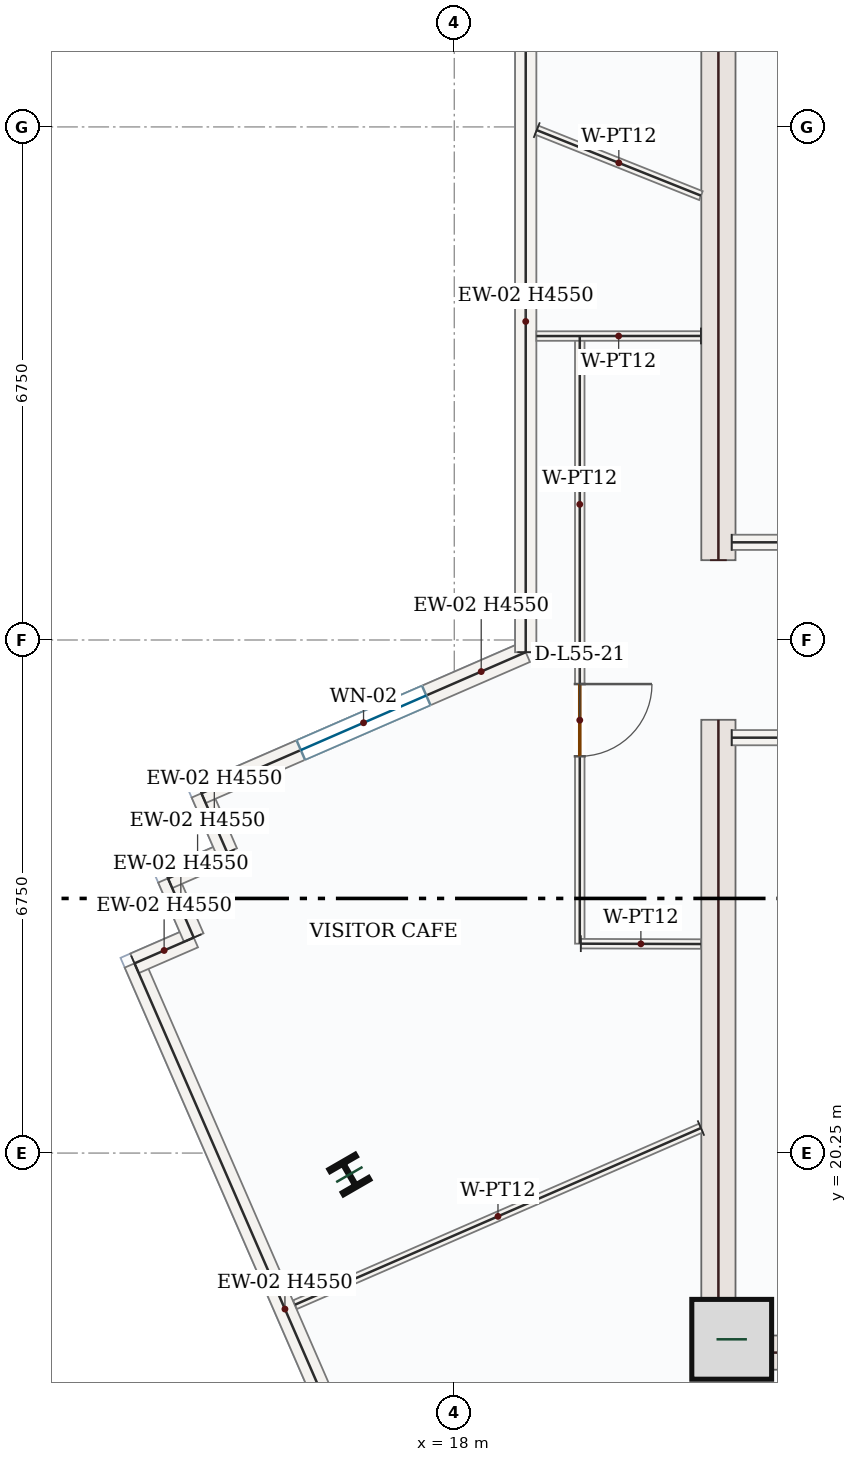
"""IFC4 building model, lengths in metres.
Left out: names, types, materials, properties, quantities, classifications, styles, units other than length and angle.
Written with IfcOpenShell. Run it as: python <this file> out.ifc"""

import sys

from ifc_helpers import new_model, si_unit, direction, frame, frame_2d, origin, origin_2d, place, context, subcontext, project, spatial, rectangle, i_section, extrude, source, transform, mapped, element, fill, save


model = new_model("IFC4")
c1 = context("Model", 3, precision=1e-05, world=origin(), true_north=direction((0.0, 1.0)))
c2 = subcontext(c1, "Body", "Model", "MODEL_VIEW")
j1 = project(units=[si_unit("LENGTHUNIT", "METRE"), si_unit("PLANEANGLEUNIT", "RADIAN")], contexts=[c1])
p1 = place(None, origin())
s1 = spatial("IfcSite", under=j1, at=p1, CompositionType="ELEMENT")
p2 = place(p1, origin())
s2 = spatial("IfcBuilding", under=s1, at=p2, CompositionType="ELEMENT")
p3 = place(p2, frame((0.0, 0.0, 234.3)))
s3 = spatial("IfcBuildingStorey", under=s2, at=p3, CompositionType="ELEMENT", Elevation=234.3)
m1 = source(origin(), c2, "Body", "SweptSolid", [
    extrude(rectangle(XDim=8.55, YDim=0.45, at=frame_2d((4.275, 0.0))), origin(), (0.0, 0.0, 1.0), 4.55),
])
for number, where, z_axis, x_axis in (
    (1, (21.475, 17.4, 0.0), (0.0, 0.0, 1.0), (0.0, 1.0, 0.0)),
    (2, (21.475, 28.05, 0.0), (0.0, 0.0, 1.0), (0.0, 1.0, 0.0)),
):
    element("IfcWall", number, at=place(p3, frame(where, z_axis=z_axis, x_axis=x_axis)), inside=s3, PredefinedType="SHEAR", context=c2, shape_type="MappedRepresentation", body=[
        mapped(m1, transform((0.0, 0.0, 0.0), x_axis=(1.0, 0.0, 0.0), y_axis=(0.0, 1.0, 0.0), z_axis=(0.0, 0.0, 1.0), scale=1.0)),
    ])
m2 = source(origin(), c2, "Body", "SweptSolid", [
    extrude(rectangle(XDim=7.1, YDim=0.45, at=frame_2d((3.55, 0.0))), origin(), (0.0, 0.0, 1.0), 4.55),
])
p4 = place(p3, frame((21.7, 17.625, 0.0), z_axis=(0.0, 0.0, 1.0), x_axis=(1.0, 0.0, 0.0)))
e3 = element("IfcWall", 3, at=p4, inside=s3, PredefinedType="SHEAR", context=c2, shape_type="MappedRepresentation", body=[
    mapped(m2, transform((0.0, 0.0, 0.0), x_axis=(1.0, 0.0, 0.0), y_axis=(0.0, 1.0, 0.0), z_axis=(0.0, 0.0, 1.0), scale=1.0)),
])
m3 = source(origin(), c2, "Body", "SweptSolid", [
    extrude(rectangle(XDim=1.05, YDim=1.05, at=origin_2d()), origin(), (0.0, 0.0, 1.0), 4.8),
])
p5 = place(p3, frame((21.65, 17.8, 0.0), z_axis=(0.0, 0.0, 1.0), x_axis=(1.0, 0.0, 0.0)))
e4 = element("IfcColumn", 4, at=p5, inside=s3, PredefinedType="COLUMN", context=c2, shape_type="MappedRepresentation", body=[
    mapped(m3, transform((0.0, 0.0, 0.0), x_axis=(1.0, 0.0, 0.0), y_axis=(0.0, 1.0, 0.0), z_axis=(0.0, 0.0, 1.0), scale=1.0)),
])
m4 = source(origin(), c2, "Body", "SweptSolid", [
    extrude(i_section(OverallWidth=0.399, OverallDepth=0.386, WebThickness=0.021, FlangeThickness=0.033, FilletRadius=0.018, at=origin_2d()), origin(), (0.0, 0.0, 1.0), 4.8),
])
p6 = place(p3, frame((16.62, 19.968, 0.0), z_axis=(0.0, 0.0, 1.0), x_axis=(0.866025403784, 0.5, 0.0)))
e5 = element("IfcColumn", 5, at=p6, inside=s3, PredefinedType="COLUMN", context=c2, shape_type="MappedRepresentation", body=[
    mapped(m4, transform((0.0, 0.0, 0.0), x_axis=(1.0, 0.0, 0.0), y_axis=(0.0, 1.0, 0.0), z_axis=(0.0, 0.0, 1.0), scale=1.0)),
])
m5 = source(origin(), c2, "Body", "SweptSolid", [
    extrude(rectangle(XDim=9.92, YDim=0.28, at=frame_2d((4.96, 0.0))), origin(), (0.0, 0.0, 1.0), 4.55),
])
p7 = place(p3, frame((17.751, 13.65, 0.0), z_axis=(0.0, 0.0, 1.0), x_axis=(-0.398992471769, 0.916954201404, 0.0)))
e6 = element("IfcWall", 6, at=p7, inside=s3, PredefinedType="SOLIDWALL", context=c2, shape_type="MappedRepresentation", body=[
    mapped(m5, transform((0.0, 0.0, 0.0), x_axis=(1.0, 0.0, 0.0), y_axis=(0.0, 1.0, 0.0), z_axis=(0.0, 0.0, 1.0), scale=1.0)),
])
m6 = source(origin(), c2, "Body", "SweptSolid", [
    extrude(rectangle(XDim=0.85, YDim=0.28, at=frame_2d((0.425, 0.0))), origin(), (0.0, 0.0, 1.0), 4.55),
])
for number, where, z_axis, x_axis in (
    (7, (13.793, 22.746, 0.0), (0.0, 0.0, 1.0), (0.917, 0.399, 0.0)),
    (8, (14.573, 23.085, 0.0), (0.0, 0.0, 1.0), (-0.399, 0.917, 0.0)),
):
    element("IfcWall", number, at=place(p3, frame(where, z_axis=z_axis, x_axis=x_axis)), inside=s3, PredefinedType="SOLIDWALL", context=c2, shape_type="MappedRepresentation", body=[
        mapped(m6, transform((0.0, 0.0, 0.0), x_axis=(1.0, 0.0, 0.0), y_axis=(0.0, 1.0, 0.0), z_axis=(0.0, 0.0, 1.0), scale=1.0)),
    ])
m7 = source(origin(), c2, "Body", "SweptSolid", [
    extrude(rectangle(XDim=0.85, YDim=0.28, at=frame_2d((0.425, 0.0))), origin(), (0.0, 0.0, 1.0), 4.55),
])
p8 = place(p3, frame((14.233, 23.864, 0.0), z_axis=(0.0, 0.0, 1.0), x_axis=(0.916841582309, 0.399251190291, 0.0)))
e9 = element("IfcWall", 9, at=p8, inside=s3, PredefinedType="SOLIDWALL", context=c2, shape_type="MappedRepresentation", body=[
    mapped(m7, transform((0.0, 0.0, 0.0), x_axis=(1.0, 0.0, 0.0), y_axis=(0.0, 1.0, 0.0), z_axis=(0.0, 0.0, 1.0), scale=1.0)),
])
p9 = place(p3, frame((15.013, 24.204, 0.0), z_axis=(0.0, 0.0, 1.0), x_axis=(-0.399009702756, 0.916946703526, 0.0)))
e10 = element("IfcWall", 10, at=p9, inside=s3, PredefinedType="SOLIDWALL", context=c2, shape_type="MappedRepresentation", body=[
    mapped(m6, transform((0.0, 0.0, 0.0), x_axis=(1.0, 0.0, 0.0), y_axis=(0.0, 1.0, 0.0), z_axis=(0.0, 0.0, 1.0), scale=1.0)),
])
p10 = place(p3, frame((14.674, 24.983, 0.0), z_axis=(0.0, 0.0, 1.0), x_axis=(0.916951557096, 0.398998548793, 0.0)))
e11 = element("IfcWall", 11, at=p10, inside=s3, PredefinedType="SOLIDWALL", context=c2, shape_type="SweptSolid", body=[
    extrude(rectangle(XDim=4.653, YDim=0.28, at=frame_2d((2.326, 0.0))), origin(), (0.0, 0.0, 1.0), 4.55),
])
p11 = place(p10, frame((1.426, 0.0, 0.85)))
e12 = element("IfcOpeningElement", 12, at=p11, cuts=e11, PredefinedType="OPENING", context=c2, shape_type="SweptSolid", body=[
    extrude(rectangle(XDim=1.8, YDim=1.75, at=frame_2d((0.9, 0.875))), frame((0.0, 0.15, 0.0), z_axis=(0.0, -1.0, 0.0), x_axis=(1.0, 0.0, 0.0)), (0.0, 0.0, 1.0), 0.3),
])
m8 = source(origin(), c2, "Body", "SweptSolid", [
    extrude(rectangle(XDim=8.703, YDim=0.28, at=frame_2d((4.351, 0.0))), origin(), (0.0, 0.0, 1.0), 4.55),
])
p12 = place(p3, frame((18.94, 26.839, 0.0), z_axis=(0.0, 0.0, 1.0), x_axis=(0.0, 1.0, 0.0)))
e13 = element("IfcWall", 13, at=p12, inside=s3, PredefinedType="SOLIDWALL", context=c2, shape_type="MappedRepresentation", body=[
    mapped(m8, transform((0.0, 0.0, 0.0), x_axis=(1.0, 0.0, 0.0), y_axis=(0.0, 1.0, 0.0), z_axis=(0.0, 0.0, 1.0), scale=1.0)),
])
m9 = source(origin(), c2, "Body", "SweptSolid", [
    extrude(rectangle(XDim=4.25, YDim=0.2, at=frame_2d((2.125, 0.0))), origin(), (0.0, 0.0, 1.0), 4.55),
])
for number, where, z_axis, x_axis in (
    (14, (21.65, 25.715, 0.0), (0.0, 0.0, 1.0), (1.0, 0.0, 0.0)),
    (15, (21.65, 28.285, 0.0), (0.0, 0.0, 1.0), (1.0, 0.0, 0.0)),
):
    element("IfcWall", number, at=place(p3, frame(where, z_axis=z_axis, x_axis=x_axis)), inside=s3, PredefinedType="SOLIDWALL", context=c2, shape_type="MappedRepresentation", body=[
        mapped(m9, transform((0.0, 0.0, 0.0), x_axis=(1.0, 0.0, 0.0), y_axis=(0.0, 1.0, 0.0), z_axis=(0.0, 0.0, 1.0), scale=1.0)),
    ])
p13 = place(p3, frame((19.651, 30.999, 0.0), z_axis=(0.0, 0.0, 1.0), x_axis=(3.0539946e-05, -0.999999999534, 0.0)))
e16 = element("IfcWall", 16, at=p13, inside=s3, PredefinedType="PARTITIONING", context=c2, shape_type="SweptSolid", body=[
    extrude(rectangle(XDim=7.994, YDim=0.125, at=frame_2d((3.997, 0.0))), origin(), (0.0, 0.0, 1.0), 4.55),
])
p14 = place(p13, frame((4.579, 0.0, 0.0)))
e17 = element("IfcOpeningElement", 17, at=p14, cuts=e16, PredefinedType="OPENING", context=c2, shape_type="SweptSolid", body=[
    extrude(rectangle(XDim=0.95, YDim=2.15, at=frame_2d((0.475, 1.075))), frame((0.0, 0.073, 0.0), z_axis=(0.0, -1.0, 0.0), x_axis=(1.0, 0.0, 0.0)), (0.0, 0.0, 1.0), 0.145),
])
m10 = source(origin(), c2, "Body", "SweptSolid", [
    extrude(rectangle(XDim=1.58, YDim=0.125, at=frame_2d((0.79, 0.0))), origin(), (0.0, 0.0, 1.0), 4.55),
])
p15 = place(p3, frame((19.665, 23.005, 0.0), z_axis=(0.0, 0.0, 1.0), x_axis=(0.999995690793, -0.002935710464, 0.0)))
e18 = element("IfcWall", 18, at=p15, inside=s3, PredefinedType="PARTITIONING", context=c2, shape_type="MappedRepresentation", body=[
    mapped(m10, transform((0.0, 0.0, 0.0), x_axis=(1.0, 0.0, 0.0), y_axis=(0.0, 1.0, 0.0), z_axis=(0.0, 0.0, 1.0), scale=1.0)),
])
m11 = source(origin(), c2, "Body", "SweptSolid", [
    extrude(rectangle(XDim=5.823, YDim=0.125, at=frame_2d((2.912, 0.0))), origin(), (0.0, 0.0, 1.0), 4.55),
])
p16 = place(p3, frame((21.245, 20.579, 0.0), z_axis=(0.0, 0.0, 1.0), x_axis=(-0.916956044868, -0.398988235141, 0.0)))
e19 = element("IfcWall", 19, at=p16, inside=s3, PredefinedType="PARTITIONING", context=c2, shape_type="MappedRepresentation", body=[
    mapped(m11, transform((0.0, 0.0, 0.0), x_axis=(1.0, 0.0, 0.0), y_axis=(0.0, 1.0, 0.0), z_axis=(0.0, 0.0, 1.0), scale=1.0)),
])
m12 = source(origin(), c2, "Body", "SweptSolid", [
    extrude(rectangle(XDim=2.326, YDim=0.125, at=frame_2d((1.163, 0.0))), origin(), (0.0, 0.0, 1.0), 4.55),
])
p17 = place(p3, frame((19.085, 33.708, 0.0), z_axis=(0.0, 0.0, 1.0), x_axis=(0.928809338362, -0.370557975183, 0.0)))
e20 = element("IfcWall", 20, at=p17, inside=s3, PredefinedType="PARTITIONING", context=c2, shape_type="MappedRepresentation", body=[
    mapped(m12, transform((0.0, 0.0, 0.0), x_axis=(1.0, 0.0, 0.0), y_axis=(0.0, 1.0, 0.0), z_axis=(0.0, 0.0, 1.0), scale=1.0)),
])
m13 = source(origin(), c2, "Body", "SweptSolid", [
    extrude(rectangle(XDim=2.165, YDim=0.125, at=frame_2d((1.083, 0.0))), origin(), (0.0, 0.0, 1.0), 4.55),
])
p18 = place(p3, frame((21.245, 31.0, 0.0), z_axis=(0.0, 0.0, 1.0), x_axis=(-0.999999771113, -0.000676589832, 0.0)))
e21 = element("IfcWall", 21, at=p18, inside=s3, PredefinedType="PARTITIONING", context=c2, shape_type="MappedRepresentation", body=[
    mapped(m13, transform((0.0, 0.0, 0.0), x_axis=(1.0, 0.0, 0.0), y_axis=(0.0, 1.0, 0.0), z_axis=(0.0, 0.0, 1.0), scale=1.0)),
])
m14 = source(origin(), c2, "Body", "SweptSolid", [
    extrude(rectangle(XDim=1.8, YDim=1.75, at=frame_2d((0.9, 0.875))), frame((0.0, 0.03, 0.0), z_axis=(0.0, -1.0, 0.0), x_axis=(1.0, 0.0, 0.0)), (0.0, 0.0, 1.0), 0.06),
])
p19 = place(p11, origin())
e22 = element("IfcWindow", 22, at=p19, inside=s3, PartitioningType="DOUBLE_PANEL_VERTICAL", PredefinedType="WINDOW", context=c2, shape_type="MappedRepresentation", body=[
    mapped(m14, transform((0.0, 0.0, 0.0), x_axis=(1.0, 0.0, 0.0), y_axis=(0.0, 1.0, 0.0), z_axis=(0.0, 0.0, 1.0), scale=1.0)),
])
fill(e12, e22)
m15 = source(origin(), c2, "Body", "SweptSolid", [
    extrude(rectangle(XDim=0.95, YDim=2.15, at=frame_2d((0.475, 1.075))), frame((0.0, 0.025, 0.0), z_axis=(0.0, -1.0, 0.0), x_axis=(1.0, 0.0, 0.0)), (0.0, 0.0, 1.0), 0.05),
])
p20 = place(p14, origin())
e23 = element("IfcDoor", 23, at=p20, inside=s3, OperationType="SINGLE_SWING_LEFT", PredefinedType="DOOR", context=c2, shape_type="MappedRepresentation", body=[
    mapped(m15, transform((0.0, 0.0, 0.0), x_axis=(1.0, 0.0, 0.0), y_axis=(0.0, 1.0, 0.0), z_axis=(0.0, 0.0, 1.0), scale=1.0)),
])
fill(e17, e23)
save(model, sys.argv[1])
